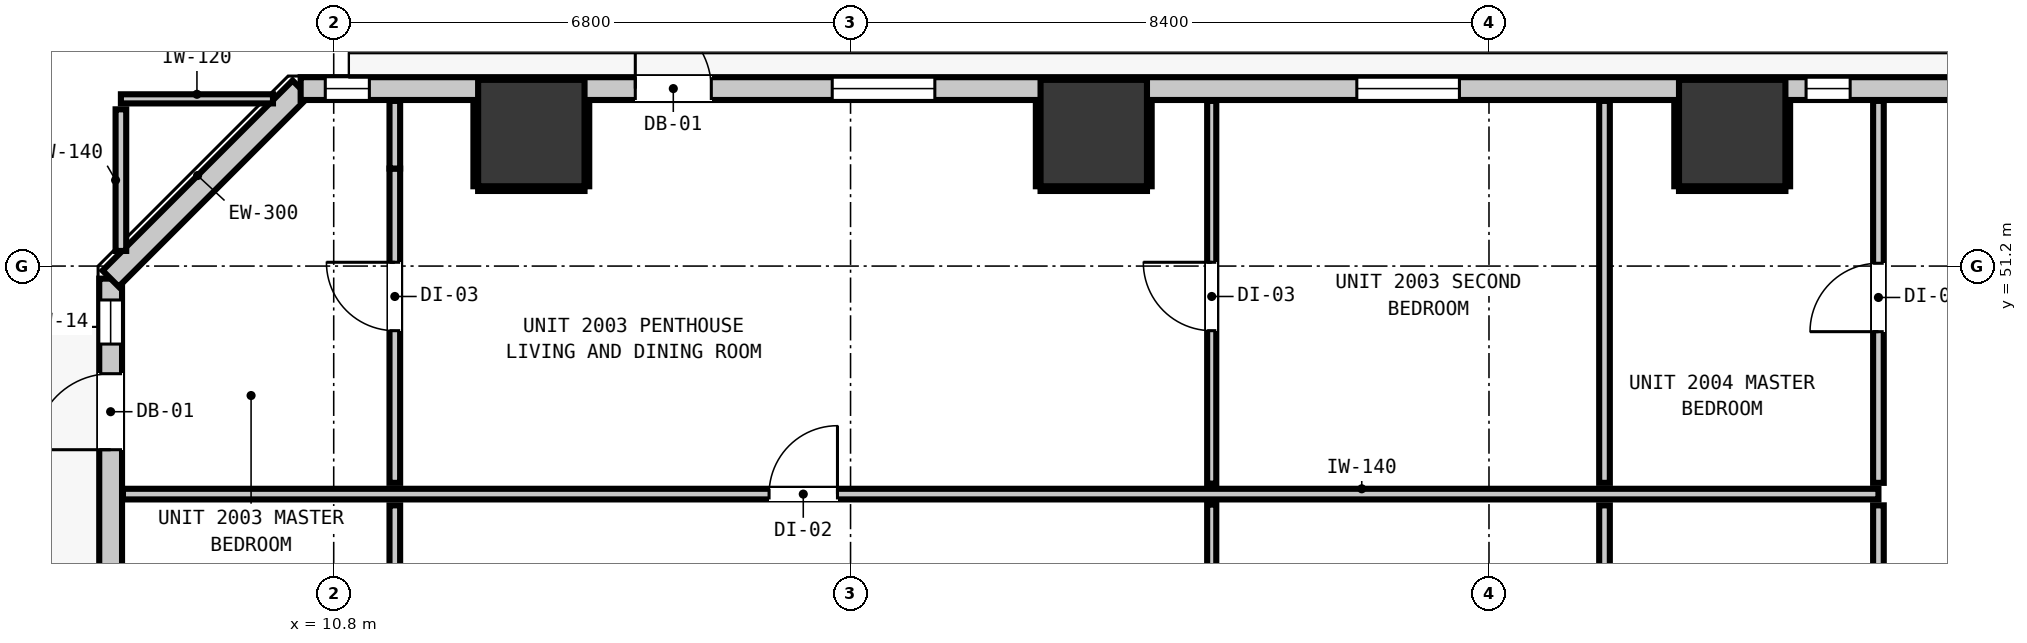
"""IFC4 building model, lengths in metres.
Left out: names, types, materials, properties, quantities, classifications, styles, units other than length and angle.
Written with IfcOpenShell. Run it as: python <this file> out.ifc"""

import sys

from ifc_helpers import new_model, si_unit, direction, frame, frame_2d, origin, origin_2d, place, context, subcontext, project, spatial, rectangle, extrude, element, fill, save


model = new_model("IFC4")
c1 = context("Model", 3, precision=1e-05, world=origin(), true_north=direction((0.0, 1.0)))
c2 = subcontext(c1, "Body", "Model", "MODEL_VIEW")
j1 = project(units=[si_unit("LENGTHUNIT", "METRE"), si_unit("PLANEANGLEUNIT", "RADIAN")], contexts=[c1])
p1 = place(None, origin())
s1 = spatial("IfcSite", under=j1, at=p1, CompositionType="ELEMENT")
p2 = place(p1, origin())
s2 = spatial("IfcBuilding", under=s1, at=p2, CompositionType="ELEMENT")
p3 = place(p2, frame((0.0, 0.0, 71.8)))
s3 = spatial("IfcBuildingStorey", under=s2, at=p3, CompositionType="ELEMENT", Elevation=71.8)
for number, where, z_axis, x_axis in (
    (1, (13.4, 52.95, 0.0), (0.0, 0.0, 1.0), (1.0, 0.0, 0.0)),
    (2, (20.8, 52.95, 0.0), (0.0, 0.0, 1.0), (1.0, 0.0, 0.0)),
    (3, (29.2, 52.95, 0.0), (0.0, 0.0, 1.0), (1.0, 0.0, 0.0)),
):
    element("IfcColumn", number, at=place(p3, frame(where, z_axis=z_axis, x_axis=x_axis)), inside=s3, PredefinedType="COLUMN", context=c2, shape_type="SweptSolid", body=[
        extrude(rectangle(XDim=1.4, YDim=1.4, at=origin_2d()), origin(), (0.0, 0.0, 1.0), 3.32),
    ])
p4 = place(p3, frame((7.865, 16.365, 0.0), z_axis=(0.0, 0.0, 1.0), x_axis=(0.0, 1.0, 0.0)))
e4 = element("IfcWall", 4, at=p4, inside=s3, PredefinedType="STANDARD", context=c2, shape_type="SweptSolid", body=[
    extrude(rectangle(XDim=34.67, YDim=0.3, at=frame_2d((17.335, 0.0))), origin(), (0.0, 0.0, 1.0), 3.06),
])
p5 = place(p4, frame((32.419, 0.0, 0.0)))
e5 = element("IfcOpeningElement", 5, at=p5, cuts=e4, PredefinedType="OPENING", context=c2, shape_type="SweptSolid", body=[
    extrude(rectangle(XDim=1.0, YDim=2.15, at=frame_2d((0.5, 1.075))), frame((0.0, 0.16, 0.0), z_axis=(0.0, -1.0, 0.0), x_axis=(1.0, 0.0, 0.0)), (0.0, 0.0, 1.0), 0.32),
])
p6 = place(p4, frame((33.809, 0.0, 0.85)))
e6 = element("IfcOpeningElement", 6, at=p6, cuts=e4, PredefinedType="OPENING", context=c2, shape_type="SweptSolid", body=[
    extrude(rectangle(XDim=0.58, YDim=1.5, at=frame_2d((0.29, 0.75))), frame((0.0, 0.16, 0.0), z_axis=(0.0, -1.0, 0.0), x_axis=(1.0, 0.0, 0.0)), (0.0, 0.0, 1.0), 0.32),
])
p7 = place(p3, frame((7.865, 51.035, 0.0), z_axis=(0.0, 0.0, 1.0), x_axis=(0.707106781187, 0.707106781187, 0.0)))
e7 = element("IfcWall", 7, at=p7, inside=s3, PredefinedType="STANDARD", context=c2, shape_type="SweptSolid", body=[
    extrude(rectangle(XDim=3.536, YDim=0.3, at=frame_2d((1.768, 0.0))), origin(), (0.0, 0.0, 1.0), 3.06),
])
p8 = place(p3, frame((10.365, 53.535, 0.0), z_axis=(0.0, 0.0, 1.0), x_axis=(1.0, 0.0, 0.0)))
e8 = element("IfcWall", 8, at=p8, inside=s3, PredefinedType="STANDARD", context=c2, shape_type="SweptSolid", body=[
    extrude(rectangle(XDim=37.47, YDim=0.3, at=frame_2d((18.735, 0.0))), origin(), (0.0, 0.0, 1.0), 3.06),
])
p9 = place(p8, frame((4.403, 0.0, 0.0)))
e9 = element("IfcOpeningElement", 9, at=p9, cuts=e8, PredefinedType="OPENING", context=c2, shape_type="SweptSolid", body=[
    extrude(rectangle(XDim=1.0, YDim=2.15, at=frame_2d((0.5, 1.075))), frame((0.0, 0.16, 0.0), z_axis=(0.0, -1.0, 0.0), x_axis=(1.0, 0.0, 0.0)), (0.0, 0.0, 1.0), 0.32),
])
p10 = place(p8, frame((6.994, 0.0, 0.85)))
e10 = element("IfcOpeningElement", 10, at=p10, cuts=e8, PredefinedType="OPENING", context=c2, shape_type="SweptSolid", body=[
    extrude(rectangle(XDim=1.35, YDim=1.85, at=frame_2d((0.675, 0.925))), frame((0.0, 0.16, 0.0), z_axis=(0.0, -1.0, 0.0), x_axis=(1.0, 0.0, 0.0)), (0.0, 0.0, 1.0), 0.32),
])
p11 = place(p8, frame((0.324, 0.0, 0.85)))
e11 = element("IfcOpeningElement", 11, at=p11, cuts=e8, PredefinedType="OPENING", context=c2, shape_type="SweptSolid", body=[
    extrude(rectangle(XDim=0.58, YDim=1.5, at=frame_2d((0.29, 0.75))), frame((0.0, 0.16, 0.0), z_axis=(0.0, -1.0, 0.0), x_axis=(1.0, 0.0, 0.0)), (0.0, 0.0, 1.0), 0.32),
])
p12 = place(p8, frame((13.896, 0.0, 0.85)))
e12 = element("IfcOpeningElement", 12, at=p12, cuts=e8, PredefinedType="OPENING", context=c2, shape_type="SweptSolid", body=[
    extrude(rectangle(XDim=1.35, YDim=1.85, at=frame_2d((0.675, 0.925))), frame((0.0, 0.16, 0.0), z_axis=(0.0, -1.0, 0.0), x_axis=(1.0, 0.0, 0.0)), (0.0, 0.0, 1.0), 0.32),
])
p13 = place(p8, frame((22.472, 0.0, 0.85)))
e13 = element("IfcOpeningElement", 13, at=p13, cuts=e8, PredefinedType="OPENING", context=c2, shape_type="SweptSolid", body=[
    extrude(rectangle(XDim=1.35, YDim=1.85, at=frame_2d((0.675, 0.925))), frame((0.0, 0.16, 0.0), z_axis=(0.0, -1.0, 0.0), x_axis=(1.0, 0.0, 0.0)), (0.0, 0.0, 1.0), 0.32),
])
p14 = place(p8, frame((19.807, 0.0, 0.85)))
e14 = element("IfcOpeningElement", 14, at=p14, cuts=e8, PredefinedType="OPENING", context=c2, shape_type="SweptSolid", body=[
    extrude(rectangle(XDim=0.58, YDim=1.5, at=frame_2d((0.29, 0.75))), frame((0.0, 0.16, 0.0), z_axis=(0.0, -1.0, 0.0), x_axis=(1.0, 0.0, 0.0)), (0.0, 0.0, 1.0), 0.32),
])
p15 = place(p8, frame((30.07, 0.0, 0.85)))
e15 = element("IfcOpeningElement", 15, at=p15, cuts=e8, PredefinedType="OPENING", context=c2, shape_type="SweptSolid", body=[
    extrude(rectangle(XDim=1.35, YDim=1.85, at=frame_2d((0.675, 0.925))), frame((0.0, 0.16, 0.0), z_axis=(0.0, -1.0, 0.0), x_axis=(1.0, 0.0, 0.0)), (0.0, 0.0, 1.0), 0.32),
])
p16 = place(p8, frame((34.953, 0.0, 0.85)))
e16 = element("IfcOpeningElement", 16, at=p16, cuts=e8, PredefinedType="OPENING", context=c2, shape_type="SweptSolid", body=[
    extrude(rectangle(XDim=1.35, YDim=1.85, at=frame_2d((0.675, 0.925))), frame((0.0, 0.16, 0.0), z_axis=(0.0, -1.0, 0.0), x_axis=(1.0, 0.0, 0.0)), (0.0, 0.0, 1.0), 0.32),
])
p17 = place(p3, frame((8.027, 48.2, 0.0), z_axis=(0.0, 0.0, 1.0), x_axis=(1.0, 0.0, 0.0)))
e17 = element("IfcWall", 17, at=p17, inside=s3, PredefinedType="PARTITIONING", context=c2, shape_type="SweptSolid", body=[
    extrude(rectangle(XDim=23.097, YDim=0.14, at=frame_2d((11.548, 0.0))), origin(), (0.0, 0.0, 1.0), 3.06),
])
p18 = place(p17, frame((8.501, 0.0, 0.0)))
e18 = element("IfcOpeningElement", 18, at=p18, cuts=e17, PredefinedType="OPENING", context=c2, shape_type="SweptSolid", body=[
    extrude(rectangle(XDim=0.9, YDim=2.1, at=frame_2d((0.45, 1.05))), frame((0.0, 0.08, 0.0), z_axis=(0.0, -1.0, 0.0), x_axis=(1.0, 0.0, 0.0)), (0.0, 0.0, 1.0), 0.16),
])
p19 = place(p3, frame((8.0, 53.4, 0.0), z_axis=(0.0, 0.0, 1.0), x_axis=(1.0, 0.0, 0.0)))
e19 = element("IfcWall", 19, at=p19, inside=s3, PredefinedType="PARTITIONING", context=c2, shape_type="SweptSolid", body=[
    extrude(rectangle(XDim=2.001, YDim=0.12, at=frame_2d((1.0, 0.0))), origin(), (0.0, 0.0, 1.0), 3.06),
])
p20 = place(p3, frame((8.0, 51.399, 0.0), z_axis=(0.0, 0.0, 1.0), x_axis=(0.0, 1.0, 0.0)))
e20 = element("IfcWall", 20, at=p20, inside=s3, PredefinedType="PARTITIONING", context=c2, shape_type="SweptSolid", body=[
    extrude(rectangle(XDim=1.863, YDim=0.14, at=frame_2d((0.932, 0.0))), origin(), (0.0, 0.0, 1.0), 3.06),
])
p21 = place(p3, frame((11.604, 42.118, 0.0), z_axis=(0.0, 0.0, 1.0), x_axis=(0.0, 1.0, 0.0)))
e21 = element("IfcWall", 21, at=p21, inside=s3, PredefinedType="PARTITIONING", context=c2, shape_type="SweptSolid", body=[
    extrude(rectangle(XDim=5.934, YDim=0.14, at=frame_2d((2.967, 0.0))), origin(), (0.0, 0.0, 1.0), 2.445),
])
p22 = place(p21, frame((2.527, 0.0, 0.0)))
e22 = element("IfcOpeningElement", 22, at=p22, cuts=e21, PredefinedType="OPENING", context=c2, shape_type="SweptSolid", body=[
    extrude(rectangle(XDim=0.86, YDim=2.02, at=frame_2d((0.43, 1.01))), frame((0.0, 0.08, 0.0), z_axis=(0.0, -1.0, 0.0), x_axis=(1.0, 0.0, 0.0)), (0.0, 0.0, 1.0), 0.16),
])
p23 = place(p3, frame((11.604, 48.348, 0.0), z_axis=(0.0, 0.0, 1.0), x_axis=(0.0, 1.0, 0.0)))
e23 = element("IfcWall", 23, at=p23, inside=s3, PredefinedType="PARTITIONING", context=c2, shape_type="SweptSolid", body=[
    extrude(rectangle(XDim=4.135, YDim=0.14, at=frame_2d((2.067, 0.0))), origin(), (0.0, 0.0, 1.0), 2.445),
])
p24 = place(p23, frame((2.002, 0.0, 0.0)))
e24 = element("IfcOpeningElement", 24, at=p24, cuts=e23, PredefinedType="OPENING", context=c2, shape_type="SweptSolid", body=[
    extrude(rectangle(XDim=0.9, YDim=2.1, at=frame_2d((0.45, 1.05))), frame((0.0, 0.08, 0.0), z_axis=(0.0, -1.0, 0.0), x_axis=(1.0, 0.0, 0.0)), (0.0, 0.0, 1.0), 0.16),
])
p25 = place(p3, frame((11.604, 52.483, 0.0), z_axis=(0.0, 0.0, 1.0), x_axis=(0.0, 1.0, 0.0)))
e25 = element("IfcWall", 25, at=p25, inside=s3, PredefinedType="PARTITIONING", context=c2, shape_type="SweptSolid", body=[
    extrude(rectangle(XDim=0.89, YDim=0.14, at=frame_2d((0.445, 0.0))), origin(), (0.0, 0.0, 1.0), 3.06),
])
p26 = place(p3, frame((27.52, 42.118, 0.0), z_axis=(0.0, 0.0, 1.0), x_axis=(0.0, 1.0, 0.0)))
e26 = element("IfcWall", 26, at=p26, inside=s3, PredefinedType="PARTITIONING", context=c2, shape_type="SweptSolid", body=[
    extrude(rectangle(XDim=5.934, YDim=0.14, at=frame_2d((2.967, 0.0))), origin(), (0.0, 0.0, 1.0), 3.06),
])
p27 = place(p3, frame((27.52, 48.348, 0.0), z_axis=(0.0, 0.0, 1.0), x_axis=(0.0, 1.0, 0.0)))
e27 = element("IfcWall", 27, at=p27, inside=s3, PredefinedType="PARTITIONING", context=c2, shape_type="SweptSolid", body=[
    extrude(rectangle(XDim=5.025, YDim=0.14, at=frame_2d((2.513, 0.0))), origin(), (0.0, 0.0, 1.0), 3.06),
])
p28 = place(p3, frame((31.124, 42.118, 0.0), z_axis=(0.0, 0.0, 1.0), x_axis=(0.0, 1.0, 0.0)))
e28 = element("IfcWall", 28, at=p28, inside=s3, PredefinedType="PARTITIONING", context=c2, shape_type="SweptSolid", body=[
    extrude(rectangle(XDim=5.934, YDim=0.14, at=frame_2d((2.967, 0.0))), origin(), (0.0, 0.0, 1.0), 3.06),
])
p29 = place(p28, frame((2.54, 0.0, 0.0)))
e29 = element("IfcOpeningElement", 29, at=p29, cuts=e28, PredefinedType="OPENING", context=c2, shape_type="SweptSolid", body=[
    extrude(rectangle(XDim=0.86, YDim=2.02, at=frame_2d((0.43, 1.01))), frame((0.0, 0.08, 0.0), z_axis=(0.0, -1.0, 0.0), x_axis=(1.0, 0.0, 0.0)), (0.0, 0.0, 1.0), 0.16),
])
p30 = place(p3, frame((31.124, 48.348, 0.0), z_axis=(0.0, 0.0, 1.0), x_axis=(0.0, 1.0, 0.0)))
e30 = element("IfcWall", 30, at=p30, inside=s3, PredefinedType="PARTITIONING", context=c2, shape_type="SweptSolid", body=[
    extrude(rectangle(XDim=5.025, YDim=0.14, at=frame_2d((2.513, 0.0))), origin(), (0.0, 0.0, 1.0), 3.06),
])
p31 = place(p30, frame((1.989, 0.0, 0.0)))
e31 = element("IfcOpeningElement", 31, at=p31, cuts=e30, PredefinedType="OPENING", context=c2, shape_type="SweptSolid", body=[
    extrude(rectangle(XDim=0.9, YDim=2.1, at=frame_2d((0.45, 1.05))), frame((0.0, 0.08, 0.0), z_axis=(0.0, -1.0, 0.0), x_axis=(1.0, 0.0, 0.0)), (0.0, 0.0, 1.0), 0.16),
])
p32 = place(p3, frame((22.352, 42.108, 0.0), z_axis=(0.0, 0.0, 1.0), x_axis=(0.0, 1.0, 0.0)))
e32 = element("IfcWall", 32, at=p32, inside=s3, PredefinedType="PARTITIONING", context=c2, shape_type="SweptSolid", body=[
    extrude(rectangle(XDim=5.954, YDim=0.12, at=frame_2d((2.977, 0.0))), origin(), (0.0, 0.0, 1.0), 3.06),
])
p33 = place(p32, frame((2.517, 0.0, 0.0)))
e33 = element("IfcOpeningElement", 33, at=p33, cuts=e32, PredefinedType="OPENING", context=c2, shape_type="SweptSolid", body=[
    extrude(rectangle(XDim=0.9, YDim=2.1, at=frame_2d((0.45, 1.05))), frame((0.0, 0.07, 0.0), z_axis=(0.0, -1.0, 0.0), x_axis=(1.0, 0.0, 0.0)), (0.0, 0.0, 1.0), 0.14),
])
p34 = place(p3, frame((22.352, 48.338, 0.0), z_axis=(0.0, 0.0, 1.0), x_axis=(0.0, 1.0, 0.0)))
e34 = element("IfcWall", 34, at=p34, inside=s3, PredefinedType="PARTITIONING", context=c2, shape_type="SweptSolid", body=[
    extrude(rectangle(XDim=5.035, YDim=0.12, at=frame_2d((2.518, 0.0))), origin(), (0.0, 0.0, 1.0), 3.06),
])
p35 = place(p34, frame((2.012, 0.0, 0.0)))
e35 = element("IfcOpeningElement", 35, at=p35, cuts=e34, PredefinedType="OPENING", context=c2, shape_type="SweptSolid", body=[
    extrude(rectangle(XDim=0.9, YDim=2.1, at=frame_2d((0.45, 1.05))), frame((0.0, 0.07, 0.0), z_axis=(0.0, -1.0, 0.0), x_axis=(1.0, 0.0, 0.0)), (0.0, 0.0, 1.0), 0.14),
])
p36 = place(p3, frame((12.7, 52.218, 0.0), z_axis=(0.0, 0.0, 1.0), x_axis=(1.0, 0.0, 0.0)))
e36 = element("IfcWall", 36, at=p36, inside=s3, PredefinedType="PARTITIONING", context=c2, shape_type="SweptSolid", body=[
    extrude(rectangle(XDim=1.4, YDim=0.06, at=frame_2d((0.7, 0.0))), origin(), (0.0, 0.0, 1.0), 1.45),
])
for number, where, z_axis, x_axis in (
    (37, (12.668, 52.25, 0.0), (0.0, 0.0, 1.0), (0.0, 1.0, 0.0)),
    (38, (14.132, 52.25, 0.0), (0.0, 0.0, 1.0), (0.0, 1.0, 0.0)),
):
    element("IfcWall", number, at=place(p3, frame(where, z_axis=z_axis, x_axis=x_axis)), inside=s3, PredefinedType="PARTITIONING", context=c2, shape_type="SweptSolid", body=[
        extrude(rectangle(XDim=1.12, YDim=0.06, at=frame_2d((0.56, 0.0))), origin(), (0.0, 0.0, 1.0), 1.45),
    ])
p37 = place(p3, frame((20.1, 52.218, 0.0), z_axis=(0.0, 0.0, 1.0), x_axis=(1.0, 0.0, 0.0)))
e39 = element("IfcWall", 39, at=p37, inside=s3, PredefinedType="PARTITIONING", context=c2, shape_type="SweptSolid", body=[
    extrude(rectangle(XDim=1.4, YDim=0.06, at=frame_2d((0.7, 0.0))), origin(), (0.0, 0.0, 1.0), 1.45),
])
for number, where, z_axis, x_axis in (
    (40, (20.068, 52.25, 0.0), (0.0, 0.0, 1.0), (0.0, 1.0, 0.0)),
    (41, (21.532, 52.25, 0.0), (0.0, 0.0, 1.0), (0.0, 1.0, 0.0)),
):
    element("IfcWall", number, at=place(p3, frame(where, z_axis=z_axis, x_axis=x_axis)), inside=s3, PredefinedType="PARTITIONING", context=c2, shape_type="SweptSolid", body=[
        extrude(rectangle(XDim=1.12, YDim=0.06, at=frame_2d((0.56, 0.0))), origin(), (0.0, 0.0, 1.0), 1.45),
    ])
p38 = place(p3, frame((28.5, 52.218, 0.0), z_axis=(0.0, 0.0, 1.0), x_axis=(1.0, 0.0, 0.0)))
e42 = element("IfcWall", 42, at=p38, inside=s3, PredefinedType="PARTITIONING", context=c2, shape_type="SweptSolid", body=[
    extrude(rectangle(XDim=1.4, YDim=0.06, at=frame_2d((0.7, 0.0))), origin(), (0.0, 0.0, 1.0), 1.45),
])
for number, where, z_axis, x_axis in (
    (43, (28.468, 52.25, 0.0), (0.0, 0.0, 1.0), (0.0, 1.0, 0.0)),
    (44, (29.932, 52.25, 0.0), (0.0, 0.0, 1.0), (0.0, 1.0, 0.0)),
):
    element("IfcWall", number, at=place(p3, frame(where, z_axis=z_axis, x_axis=x_axis)), inside=s3, PredefinedType="PARTITIONING", context=c2, shape_type="SweptSolid", body=[
        extrude(rectangle(XDim=1.12, YDim=0.06, at=frame_2d((0.56, 0.0))), origin(), (0.0, 0.0, 1.0), 1.45),
    ])
p39 = place(p9, origin())
e45 = element("IfcDoor", 45, at=p39, inside=s3, OperationType="SINGLE_SWING_LEFT", PredefinedType="DOOR", context=c2, shape_type="SweptSolid", body=[
    extrude(rectangle(XDim=1.0, YDim=2.15, at=frame_2d((0.5, 1.075))), frame((0.0, 0.025, 0.0), z_axis=(0.0, -1.0, 0.0), x_axis=(1.0, 0.0, 0.0)), (0.0, 0.0, 1.0), 0.05),
])
fill(e9, e45)
p40 = place(p5, origin())
e46 = element("IfcDoor", 46, at=p40, inside=s3, OperationType="SINGLE_SWING_LEFT", PredefinedType="DOOR", context=c2, shape_type="SweptSolid", body=[
    extrude(rectangle(XDim=1.0, YDim=2.15, at=frame_2d((0.5, 1.075))), frame((0.0, 0.025, 0.0), z_axis=(0.0, -1.0, 0.0), x_axis=(1.0, 0.0, 0.0)), (0.0, 0.0, 1.0), 0.05),
])
fill(e5, e46)
p41 = place(p6, origin())
e47 = element("IfcWindow", 47, at=p41, inside=s3, PartitioningType="SINGLE_PANEL", PredefinedType="WINDOW", context=c2, shape_type="SweptSolid", body=[
    extrude(rectangle(XDim=0.58, YDim=1.5, at=frame_2d((0.29, 0.75))), frame((0.0, 0.03, 0.0), z_axis=(0.0, -1.0, 0.0), x_axis=(1.0, 0.0, 0.0)), (0.0, 0.0, 1.0), 0.06),
])
fill(e6, e47)
p42 = place(p10, origin())
e48 = element("IfcWindow", 48, at=p42, inside=s3, PartitioningType="SINGLE_PANEL", PredefinedType="WINDOW", context=c2, shape_type="SweptSolid", body=[
    extrude(rectangle(XDim=1.35, YDim=1.85, at=frame_2d((0.675, 0.925))), frame((0.0, 0.03, 0.0), z_axis=(0.0, -1.0, 0.0), x_axis=(1.0, 0.0, 0.0)), (0.0, 0.0, 1.0), 0.06),
])
fill(e10, e48)
p43 = place(p11, origin())
e49 = element("IfcWindow", 49, at=p43, inside=s3, PartitioningType="SINGLE_PANEL", PredefinedType="WINDOW", context=c2, shape_type="SweptSolid", body=[
    extrude(rectangle(XDim=0.58, YDim=1.5, at=frame_2d((0.29, 0.75))), frame((0.0, 0.03, 0.0), z_axis=(0.0, -1.0, 0.0), x_axis=(1.0, 0.0, 0.0)), (0.0, 0.0, 1.0), 0.06),
])
fill(e11, e49)
p44 = place(p12, origin())
e50 = element("IfcWindow", 50, at=p44, inside=s3, PartitioningType="SINGLE_PANEL", PredefinedType="WINDOW", context=c2, shape_type="SweptSolid", body=[
    extrude(rectangle(XDim=1.35, YDim=1.85, at=frame_2d((0.675, 0.925))), frame((0.0, 0.03, 0.0), z_axis=(0.0, -1.0, 0.0), x_axis=(1.0, 0.0, 0.0)), (0.0, 0.0, 1.0), 0.06),
])
fill(e12, e50)
p45 = place(p14, origin())
e51 = element("IfcWindow", 51, at=p45, inside=s3, PartitioningType="SINGLE_PANEL", PredefinedType="WINDOW", context=c2, shape_type="SweptSolid", body=[
    extrude(rectangle(XDim=0.58, YDim=1.5, at=frame_2d((0.29, 0.75))), frame((0.0, 0.03, 0.0), z_axis=(0.0, -1.0, 0.0), x_axis=(1.0, 0.0, 0.0)), (0.0, 0.0, 1.0), 0.06),
])
fill(e14, e51)
p46 = place(p18, origin())
e52 = element("IfcDoor", 52, at=p46, inside=s3, OperationType="SINGLE_SWING_RIGHT", PredefinedType="DOOR", context=c2, shape_type="SweptSolid", body=[
    extrude(rectangle(XDim=0.9, YDim=2.1, at=frame_2d((0.45, 1.05))), frame((0.0, 0.025, 0.0), z_axis=(0.0, -1.0, 0.0), x_axis=(1.0, 0.0, 0.0)), (0.0, 0.0, 1.0), 0.05),
])
fill(e18, e52)
p47 = place(p24, origin())
e53 = element("IfcDoor", 53, at=p47, inside=s3, OperationType="SINGLE_SWING_RIGHT", PredefinedType="DOOR", context=c2, shape_type="SweptSolid", body=[
    extrude(rectangle(XDim=0.9, YDim=2.1, at=frame_2d((0.45, 1.05))), frame((0.0, 0.025, 0.0), z_axis=(0.0, -1.0, 0.0), x_axis=(1.0, 0.0, 0.0)), (0.0, 0.0, 1.0), 0.05),
])
fill(e24, e53)
p48 = place(p35, origin())
e54 = element("IfcDoor", 54, at=p48, inside=s3, OperationType="SINGLE_SWING_RIGHT", PredefinedType="DOOR", context=c2, shape_type="SweptSolid", body=[
    extrude(rectangle(XDim=0.9, YDim=2.1, at=frame_2d((0.45, 1.05))), frame((0.0, 0.025, 0.0), z_axis=(0.0, -1.0, 0.0), x_axis=(1.0, 0.0, 0.0)), (0.0, 0.0, 1.0), 0.05),
])
fill(e35, e54)
p49 = place(p31, origin())
e55 = element("IfcDoor", 55, at=p49, inside=s3, OperationType="SINGLE_SWING_LEFT", PredefinedType="DOOR", context=c2, shape_type="SweptSolid", body=[
    extrude(rectangle(XDim=0.9, YDim=2.1, at=frame_2d((0.45, 1.05))), frame((0.0, 0.025, 0.0), z_axis=(0.0, -1.0, 0.0), x_axis=(1.0, 0.0, 0.0)), (0.0, 0.0, 1.0), 0.05),
])
fill(e31, e55)
save(model, sys.argv[1])
